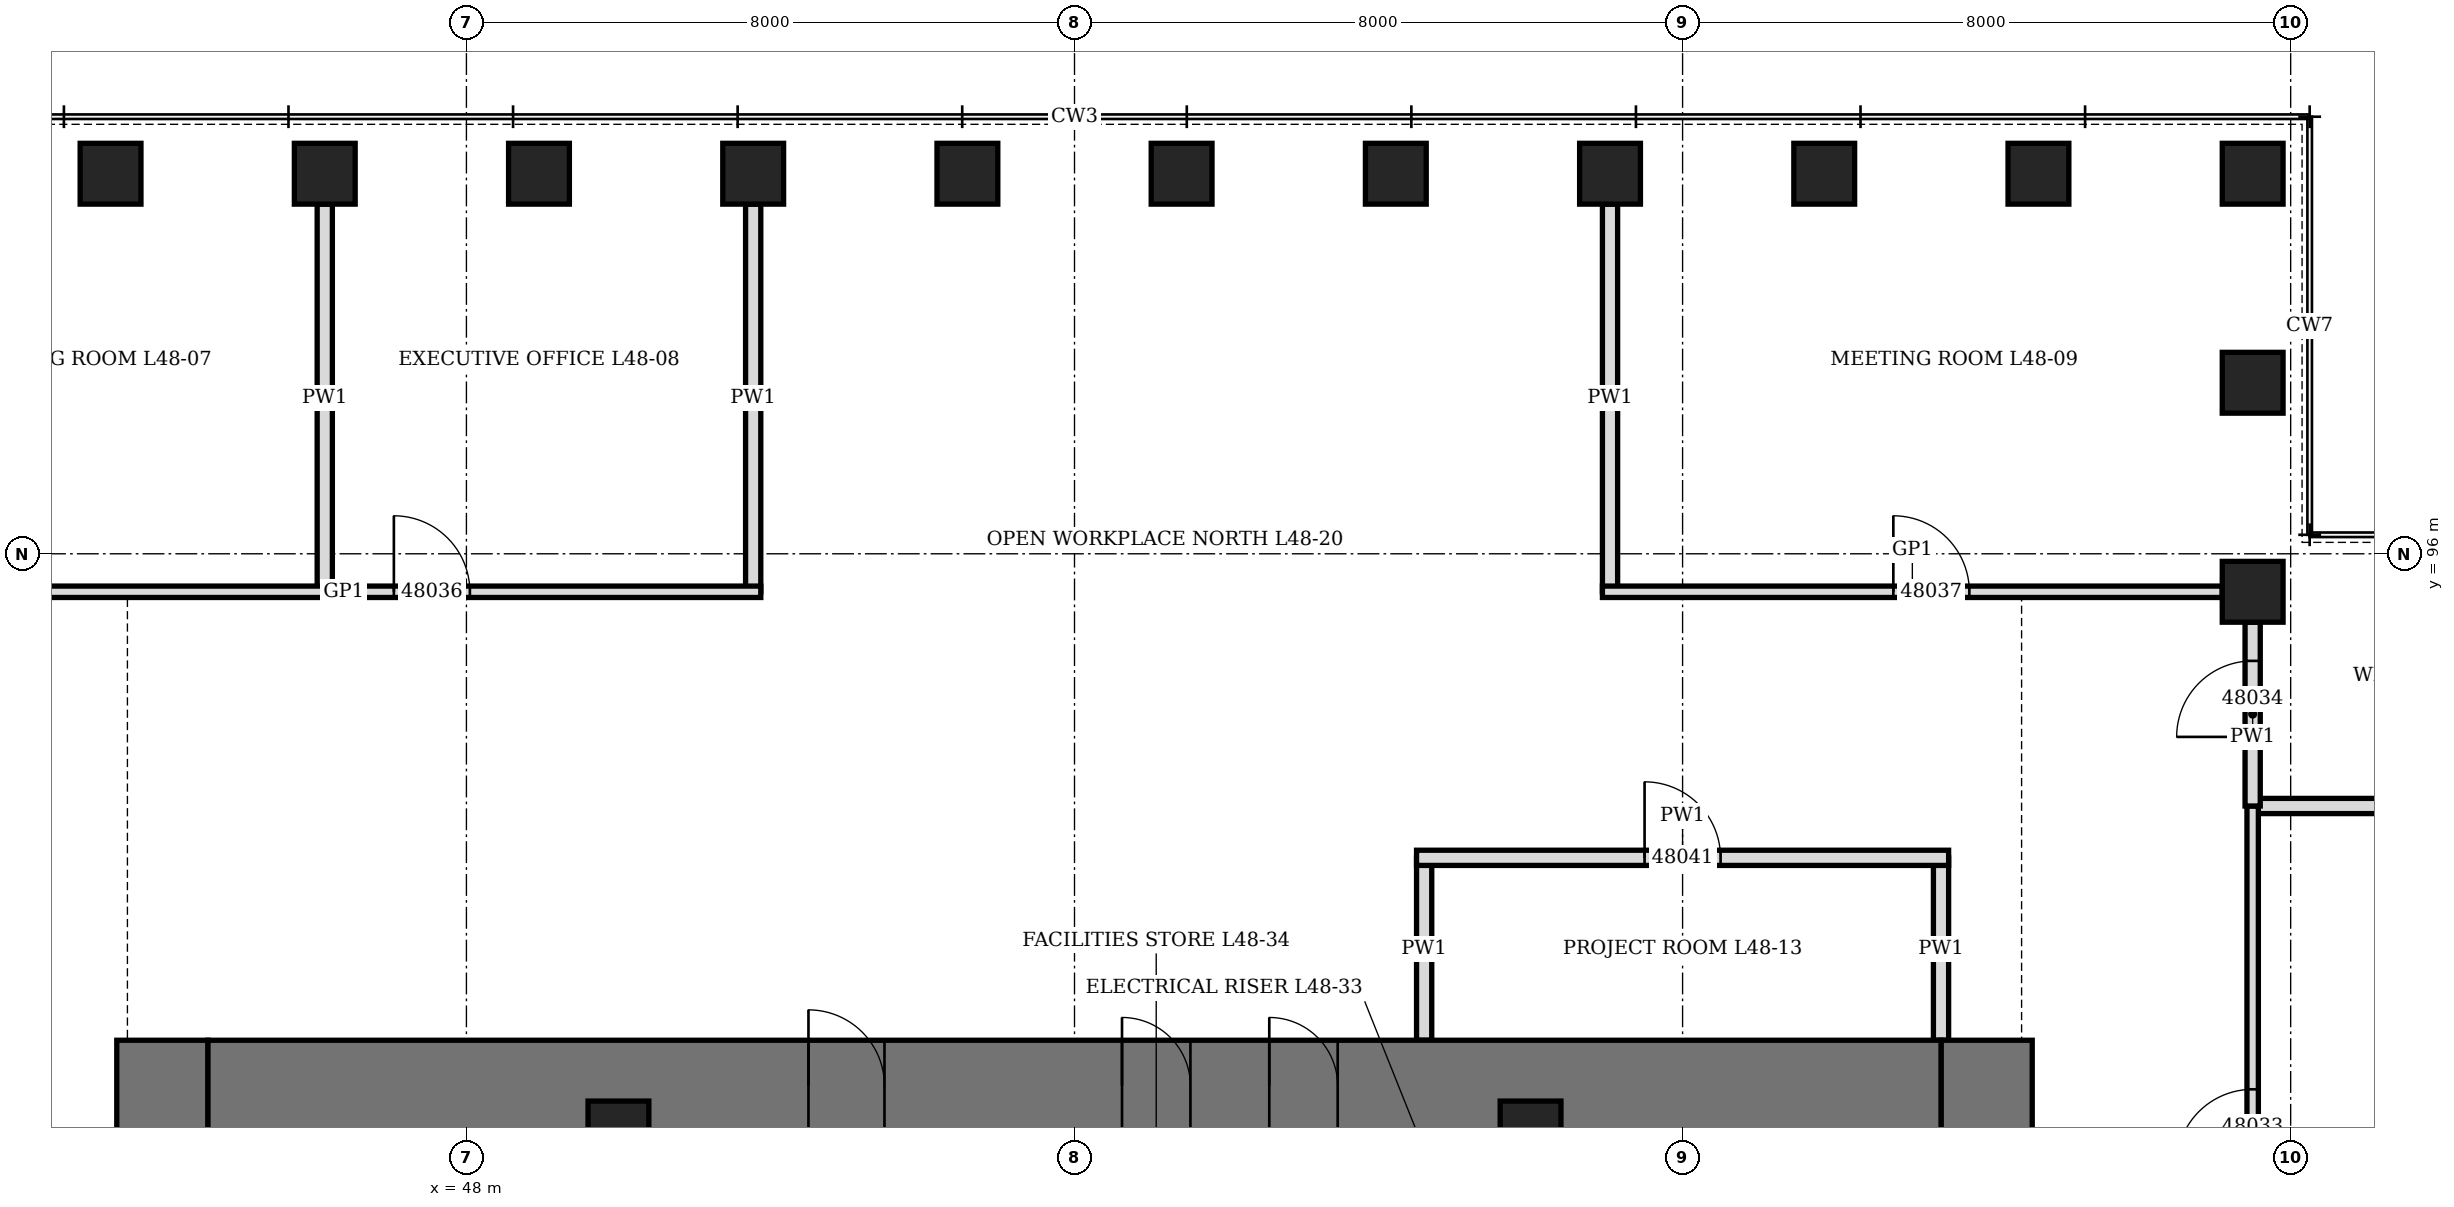
"""IFC4 building model, lengths in metres.
Left out: names, types, materials, properties, quantities, classifications, styles, units other than length and angle.
Written with IfcOpenShell. Run it as: python <this file> out.ifc"""

import sys

from ifc_helpers import new_model, si_unit, direction, frame, frame_2d, origin, origin_2d, place, context, subcontext, project, spatial, rectangle, hollow_rectangle, extrude, element, fill, save


model = new_model("IFC4")
c1 = context("Model", 3, precision=1e-05, world=origin(), true_north=direction((0.0, 1.0)))
c2 = subcontext(c1, "Body", "Model", "MODEL_VIEW")
j1 = project(units=[si_unit("LENGTHUNIT", "METRE"), si_unit("PLANEANGLEUNIT", "RADIAN")], contexts=[c1])
p1 = place(None, origin())
s1 = spatial("IfcSite", under=j1, at=p1, CompositionType="ELEMENT")
p2 = place(p1, origin())
s2 = spatial("IfcBuilding", under=s1, at=p2, CompositionType="ELEMENT")
p3 = place(p2, frame((0.0, 0.0, 214.9)))
s3 = spatial("IfcBuildingStorey", under=s2, at=p3, CompositionType="ELEMENT", Elevation=214.9)
for number, where, z_axis, x_axis in (
    (1, (71.5, 95.5, 0.0), (0.0, 0.0, 1.0), (0.0, 1.0, 0.0)),
    (2, (71.5, 98.25, 0.0), (0.0, 0.0, 1.0), (0.0, 1.0, 0.0)),
    (3, (71.5, 101.0, 0.0), (0.0, 0.0, 1.0), (1.0, 0.0, 0.0)),
    (4, (68.682, 101.0, 0.0), (0.0, 0.0, 1.0), (1.0, 0.0, 0.0)),
    (5, (65.864, 101.0, 0.0), (0.0, 0.0, 1.0), (1.0, 0.0, 0.0)),
    (6, (63.045, 101.0, 0.0), (0.0, 0.0, 1.0), (1.0, 0.0, 0.0)),
    (7, (60.227, 101.0, 0.0), (0.0, 0.0, 1.0), (1.0, 0.0, 0.0)),
    (8, (57.409, 101.0, 0.0), (0.0, 0.0, 1.0), (1.0, 0.0, 0.0)),
    (9, (54.591, 101.0, 0.0), (0.0, 0.0, 1.0), (1.0, 0.0, 0.0)),
    (10, (51.773, 101.0, 0.0), (0.0, 0.0, 1.0), (1.0, 0.0, 0.0)),
    (11, (48.955, 101.0, 0.0), (0.0, 0.0, 1.0), (1.0, 0.0, 0.0)),
    (12, (46.136, 101.0, 0.0), (0.0, 0.0, 1.0), (1.0, 0.0, 0.0)),
    (13, (43.318, 101.0, 0.0), (0.0, 0.0, 1.0), (1.0, 0.0, 0.0)),
):
    element("IfcColumn", number, at=place(p3, frame(where, z_axis=z_axis, x_axis=x_axis)), inside=s3, PredefinedType="COLUMN", context=c2, shape_type="SweptSolid", body=[
        extrude(hollow_rectangle(XDim=0.8, YDim=0.8, WallThickness=0.08, at=origin_2d()), origin(), (0.0, 0.0, 1.0), 4.2),
    ])
p4 = place(p3, frame((44.0, 70.4, 0.0), z_axis=(0.0, 0.0, 1.0), x_axis=(0.0, 1.0, 0.0)))
e14 = element("IfcWall", 14, at=p4, inside=s3, PredefinedType="SHEAR", context=c2, shape_type="SweptSolid", body=[
    extrude(rectangle(XDim=19.2, YDim=1.2, at=frame_2d((9.6, 0.0))), origin(), (0.0, 0.0, 1.0), 4.2),
])
p5 = place(p4, frame((8.6, 0.0, 0.0)))
e15 = element("IfcOpeningElement", 15, at=p5, cuts=e14, PredefinedType="OPENING", context=c2, shape_type="SweptSolid", body=[
    extrude(rectangle(XDim=2.0, YDim=2.4, at=frame_2d((1.0, 1.2))), frame((0.0, 0.61, 0.0), z_axis=(0.0, -1.0, 0.0), x_axis=(1.0, 0.0, 0.0)), (0.0, 0.0, 1.0), 1.22),
])
p6 = place(p3, frame((68.0, 70.4, 0.0), z_axis=(0.0, 0.0, 1.0), x_axis=(0.0, 1.0, 0.0)))
e16 = element("IfcWall", 16, at=p6, inside=s3, PredefinedType="SHEAR", context=c2, shape_type="SweptSolid", body=[
    extrude(rectangle(XDim=19.2, YDim=1.2, at=frame_2d((9.6, 0.0))), origin(), (0.0, 0.0, 1.0), 4.2),
])
p7 = place(p6, frame((8.6, 0.0, 0.0)))
e17 = element("IfcOpeningElement", 17, at=p7, cuts=e16, PredefinedType="OPENING", context=c2, shape_type="SweptSolid", body=[
    extrude(rectangle(XDim=2.0, YDim=2.4, at=frame_2d((1.0, 1.2))), frame((0.0, 0.61, 0.0), z_axis=(0.0, -1.0, 0.0), x_axis=(1.0, 0.0, 0.0)), (0.0, 0.0, 1.0), 1.22),
])
p8 = place(p3, frame((44.6, 89.0, 0.0), z_axis=(0.0, 0.0, 1.0), x_axis=(1.0, 0.0, 0.0)))
e18 = element("IfcWall", 18, at=p8, inside=s3, PredefinedType="SHEAR", context=c2, shape_type="SweptSolid", body=[
    extrude(rectangle(XDim=22.8, YDim=1.2, at=frame_2d((11.4, 0.0))), origin(), (0.0, 0.0, 1.0), 4.2),
])
p9 = place(p8, frame((7.9, 0.0, 0.0)))
e19 = element("IfcOpeningElement", 19, at=p9, cuts=e18, PredefinedType="OPENING", context=c2, shape_type="SweptSolid", body=[
    extrude(rectangle(XDim=1.0, YDim=2.1, at=frame_2d((0.5, 1.05))), frame((0.0, 0.61, 0.0), z_axis=(0.0, -1.0, 0.0), x_axis=(1.0, 0.0, 0.0)), (0.0, 0.0, 1.0), 1.22),
])
p10 = place(p8, frame((12.025, 0.0, 0.0)))
e20 = element("IfcOpeningElement", 20, at=p10, cuts=e18, PredefinedType="OPENING", context=c2, shape_type="SweptSolid", body=[
    extrude(rectangle(XDim=0.9, YDim=2.1, at=frame_2d((0.45, 1.05))), frame((0.0, 0.61, 0.0), z_axis=(0.0, -1.0, 0.0), x_axis=(1.0, 0.0, 0.0)), (0.0, 0.0, 1.0), 1.22),
])
p11 = place(p8, frame((13.962, 0.0, 0.0)))
e21 = element("IfcOpeningElement", 21, at=p11, cuts=e18, PredefinedType="OPENING", context=c2, shape_type="SweptSolid", body=[
    extrude(rectangle(XDim=0.9, YDim=2.1, at=frame_2d((0.45, 1.05))), frame((0.0, 0.61, 0.0), z_axis=(0.0, -1.0, 0.0), x_axis=(1.0, 0.0, 0.0)), (0.0, 0.0, 1.0), 1.22),
])
for number, where, z_axis, x_axis in (
    (22, (50.0, 88.4, 0.0), (0.0, 0.0, 1.0), (1.0, 0.0, 0.0)),
    (23, (62.0, 88.4, 0.0), (0.0, 0.0, 1.0), (1.0, 0.0, 0.0)),
):
    element("IfcColumn", number, at=place(p3, frame(where, z_axis=z_axis, x_axis=x_axis)), inside=s3, PredefinedType="COLUMN", context=c2, shape_type="SweptSolid", body=[
        extrude(hollow_rectangle(XDim=0.8, YDim=0.8, WallThickness=0.1, at=origin_2d()), origin(), (0.0, 0.0, 1.0), 4.2),
    ])
for number, where, z_axis, x_axis in (
    (24, (71.5, 92.682, 0.0), (0.0, 0.0, 1.0), (1.0, 0.0, 0.0)),
    (25, (46.136, 95.5, 0.0), (0.0, 0.0, 1.0), (0.0, 1.0, 0.0)),
    (26, (51.773, 95.5, 0.0), (0.0, 0.0, 1.0), (0.0, 1.0, 0.0)),
    (27, (63.045, 95.5, 0.0), (0.0, 0.0, 1.0), (0.0, 1.0, 0.0)),
):
    element("IfcWall", number, at=place(p3, frame(where, z_axis=z_axis, x_axis=x_axis)), inside=s3, PredefinedType="PARTITIONING", context=c2, shape_type="SweptSolid", body=[
        extrude(rectangle(XDim=5.1, YDim=0.2, at=frame_2d((2.55, 0.0))), origin(), (0.0, 0.0, 1.0), 3.428),
    ])
for number, where, z_axis, x_axis in (
    (28, (60.6, 89.6, 0.0), (0.0, 0.0, 1.0), (0.0, 1.0, 0.0)),
    (29, (67.4, 89.6, 0.0), (0.0, 0.0, 1.0), (0.0, 1.0, 0.0)),
):
    element("IfcWall", number, at=place(p3, frame(where, z_axis=z_axis, x_axis=x_axis)), inside=s3, PredefinedType="PARTITIONING", context=c2, shape_type="SweptSolid", body=[
        extrude(rectangle(XDim=2.4, YDim=0.2, at=frame_2d((1.2, 0.0))), origin(), (0.0, 0.0, 1.0), 4.04),
    ])
p12 = place(p3, frame((60.5, 92.0, 0.0), z_axis=(0.0, 0.0, 1.0), x_axis=(1.0, 0.0, 0.0)))
e30 = element("IfcWall", 30, at=p12, inside=s3, PredefinedType="PARTITIONING", context=c2, shape_type="SweptSolid", body=[
    extrude(rectangle(XDim=7.0, YDim=0.2, at=frame_2d((3.5, 0.0))), origin(), (0.0, 0.0, 1.0), 4.04),
])
p13 = place(p12, frame((3.0, 0.0, 0.0)))
e31 = element("IfcOpeningElement", 31, at=p13, cuts=e30, PredefinedType="OPENING", context=c2, shape_type="SweptSolid", body=[
    extrude(rectangle(XDim=1.0, YDim=2.1, at=frame_2d((0.5, 1.05))), frame((0.0, 0.11, 0.0), z_axis=(0.0, -1.0, 0.0), x_axis=(1.0, 0.0, 0.0)), (0.0, 0.0, 1.0), 0.22),
])
p14 = place(p3, frame((40.9, 95.5, 0.0), z_axis=(0.0, 0.0, 1.0), x_axis=(1.0, 0.0, 0.0)))
e32 = element("IfcWall", 32, at=p14, inside=s3, PredefinedType="PARTITIONING", context=c2, shape_type="SweptSolid", body=[
    extrude(rectangle(XDim=10.973, YDim=0.15, at=frame_2d((5.486, 0.0))), origin(), (0.0, 0.0, 1.0), 4.04),
])
p15 = place(p14, frame((0.509, 0.0, 0.0)))
e33 = element("IfcOpeningElement", 33, at=p15, cuts=e32, PredefinedType="OPENING", context=c2, shape_type="SweptSolid", body=[
    extrude(rectangle(XDim=1.0, YDim=2.4, at=frame_2d((0.5, 1.2))), frame((0.0, 0.085, 0.0), z_axis=(0.0, -1.0, 0.0), x_axis=(1.0, 0.0, 0.0)), (0.0, 0.0, 1.0), 0.17),
])
p16 = place(p14, frame((6.146, 0.0, 0.0)))
e34 = element("IfcOpeningElement", 34, at=p16, cuts=e32, PredefinedType="OPENING", context=c2, shape_type="SweptSolid", body=[
    extrude(rectangle(XDim=1.0, YDim=2.1, at=frame_2d((0.5, 1.05))), frame((0.0, 0.085, 0.0), z_axis=(0.0, -1.0, 0.0), x_axis=(1.0, 0.0, 0.0)), (0.0, 0.0, 1.0), 0.17),
])
p17 = place(p3, frame((62.946, 95.5, 0.0), z_axis=(0.0, 0.0, 1.0), x_axis=(1.0, 0.0, 0.0)))
e35 = element("IfcWall", 35, at=p17, inside=s3, PredefinedType="PARTITIONING", context=c2, shape_type="SweptSolid", body=[
    extrude(rectangle(XDim=8.155, YDim=0.15, at=frame_2d((4.077, 0.0))), origin(), (0.0, 0.0, 1.0), 4.04),
])
p18 = place(p17, frame((3.827, 0.0, 0.0)))
e36 = element("IfcOpeningElement", 36, at=p18, cuts=e35, PredefinedType="OPENING", context=c2, shape_type="SweptSolid", body=[
    extrude(rectangle(XDim=1.0, YDim=2.4, at=frame_2d((0.5, 1.2))), frame((0.0, 0.085, 0.0), z_axis=(0.0, -1.0, 0.0), x_axis=(1.0, 0.0, 0.0)), (0.0, 0.0, 1.0), 0.17),
])
p19 = place(p3, frame((71.5, 81.309, 0.0), z_axis=(0.0, 0.0, 1.0), x_axis=(0.0, 1.0, 0.0)))
e37 = element("IfcWall", 37, at=p19, inside=s3, PredefinedType="PARTITIONING", context=c2, shape_type="SweptSolid", body=[
    extrude(rectangle(XDim=11.373, YDim=0.15, at=frame_2d((5.687, 0.0))), origin(), (0.0, 0.0, 1.0), 4.04),
])
p20 = place(p19, frame((1.009, 0.0, 0.0)))
e38 = element("IfcOpeningElement", 38, at=p20, cuts=e37, PredefinedType="OPENING", context=c2, shape_type="SweptSolid", body=[
    extrude(rectangle(XDim=1.0, YDim=2.1, at=frame_2d((0.5, 1.05))), frame((0.0, 0.085, 0.0), z_axis=(0.0, -1.0, 0.0), x_axis=(1.0, 0.0, 0.0)), (0.0, 0.0, 1.0), 0.17),
])
p21 = place(p19, frame((6.646, 0.0, 0.0)))
e39 = element("IfcOpeningElement", 39, at=p21, cuts=e37, PredefinedType="OPENING", context=c2, shape_type="SweptSolid", body=[
    extrude(rectangle(XDim=1.0, YDim=2.1, at=frame_2d((0.5, 1.05))), frame((0.0, 0.085, 0.0), z_axis=(0.0, -1.0, 0.0), x_axis=(1.0, 0.0, 0.0)), (0.0, 0.0, 1.0), 0.17),
])
p22 = place(p3, frame((71.5, 92.682, 0.0), z_axis=(0.0, 0.0, 1.0), x_axis=(0.0, 1.0, 0.0)))
e40 = element("IfcWall", 40, at=p22, inside=s3, PredefinedType="PARTITIONING", context=c2, shape_type="SweptSolid", body=[
    extrude(rectangle(XDim=2.418, YDim=0.2, at=frame_2d((1.209, 0.0))), origin(), (0.0, 0.0, 1.0), 4.04),
])
p23 = place(p22, frame((0.909, 0.0, 0.0)))
e41 = element("IfcOpeningElement", 41, at=p23, cuts=e40, PredefinedType="OPENING", context=c2, shape_type="SweptSolid", body=[
    extrude(rectangle(XDim=1.0, YDim=2.1, at=frame_2d((0.5, 1.05))), frame((0.0, 0.11, 0.0), z_axis=(0.0, -1.0, 0.0), x_axis=(1.0, 0.0, 0.0)), (0.0, 0.0, 1.0), 0.22),
])
p24 = place(p9, origin())
e42 = element("IfcDoor", 42, at=p24, inside=s3, OperationType="SINGLE_SWING_LEFT", PredefinedType="DOOR", context=c2, shape_type="SweptSolid", body=[
    extrude(rectangle(XDim=1.0, YDim=2.1, at=frame_2d((0.5, 1.05))), frame((0.0, 0.35, 0.0), z_axis=(0.0, -1.0, 0.0), x_axis=(1.0, 0.0, 0.0)), (0.0, 0.0, 1.0), 0.7),
])
fill(e19, e42)
p25 = place(p10, origin())
e43 = element("IfcDoor", 43, at=p25, inside=s3, OperationType="SINGLE_SWING_LEFT", PredefinedType="DOOR", context=c2, shape_type="SweptSolid", body=[
    extrude(rectangle(XDim=0.9, YDim=2.1, at=frame_2d((0.45, 1.05))), frame((0.0, 0.35, 0.0), z_axis=(0.0, -1.0, 0.0), x_axis=(1.0, 0.0, 0.0)), (0.0, 0.0, 1.0), 0.7),
])
fill(e20, e43)
p26 = place(p11, origin())
e44 = element("IfcDoor", 44, at=p26, inside=s3, OperationType="SINGLE_SWING_LEFT", PredefinedType="DOOR", context=c2, shape_type="SweptSolid", body=[
    extrude(rectangle(XDim=0.9, YDim=2.1, at=frame_2d((0.45, 1.05))), frame((0.0, 0.35, 0.0), z_axis=(0.0, -1.0, 0.0), x_axis=(1.0, 0.0, 0.0)), (0.0, 0.0, 1.0), 0.7),
])
fill(e21, e44)
p27 = place(p21, origin())
e45 = element("IfcDoor", 45, at=p27, inside=s3, OperationType="SINGLE_SWING_LEFT", PredefinedType="DOOR", context=c2, shape_type="SweptSolid", body=[
    extrude(rectangle(XDim=1.0, YDim=2.1, at=frame_2d((0.5, 1.05))), frame((0.0, 0.075, 0.0), z_axis=(0.0, -1.0, 0.0), x_axis=(1.0, 0.0, 0.0)), (0.0, 0.0, 1.0), 0.149),
])
fill(e39, e45)
p28 = place(p23, origin())
e46 = element("IfcDoor", 46, at=p28, inside=s3, OperationType="SINGLE_SWING_LEFT", PredefinedType="DOOR", context=c2, shape_type="SweptSolid", body=[
    extrude(rectangle(XDim=1.0, YDim=2.1, at=frame_2d((0.5, 1.05))), frame((0.0, 0.1, 0.0), z_axis=(0.0, -1.0, 0.0), x_axis=(1.0, 0.0, 0.0)), (0.0, 0.0, 1.0), 0.199),
])
fill(e41, e46)
p29 = place(p16, origin())
e47 = element("IfcDoor", 47, at=p29, inside=s3, OperationType="SINGLE_SWING_LEFT", PredefinedType="DOOR", context=c2, shape_type="SweptSolid", body=[
    extrude(rectangle(XDim=1.0, YDim=2.1, at=frame_2d((0.5, 1.05))), frame((0.0, 0.075, 0.0), z_axis=(0.0, -1.0, 0.0), x_axis=(1.0, 0.0, 0.0)), (0.0, 0.0, 1.0), 0.149),
])
fill(e34, e47)
p30 = place(p18, origin())
e48 = element("IfcDoor", 48, at=p30, inside=s3, OperationType="SINGLE_SWING_RIGHT", PredefinedType="DOOR", context=c2, shape_type="SweptSolid", body=[
    extrude(rectangle(XDim=1.0, YDim=2.4, at=frame_2d((0.5, 1.2))), frame((0.0, 0.075, 0.0), z_axis=(0.0, -1.0, 0.0), x_axis=(1.0, 0.0, 0.0)), (0.0, 0.0, 1.0), 0.149),
])
fill(e36, e48)
p31 = place(p13, origin())
e49 = element("IfcDoor", 49, at=p31, inside=s3, OperationType="SINGLE_SWING_LEFT", PredefinedType="DOOR", context=c2, shape_type="SweptSolid", body=[
    extrude(rectangle(XDim=1.0, YDim=2.1, at=frame_2d((0.5, 1.05))), frame((0.0, 0.1, 0.0), z_axis=(0.0, -1.0, 0.0), x_axis=(1.0, 0.0, 0.0)), (0.0, 0.0, 1.0), 0.199),
])
fill(e31, e49)
save(model, sys.argv[1])
